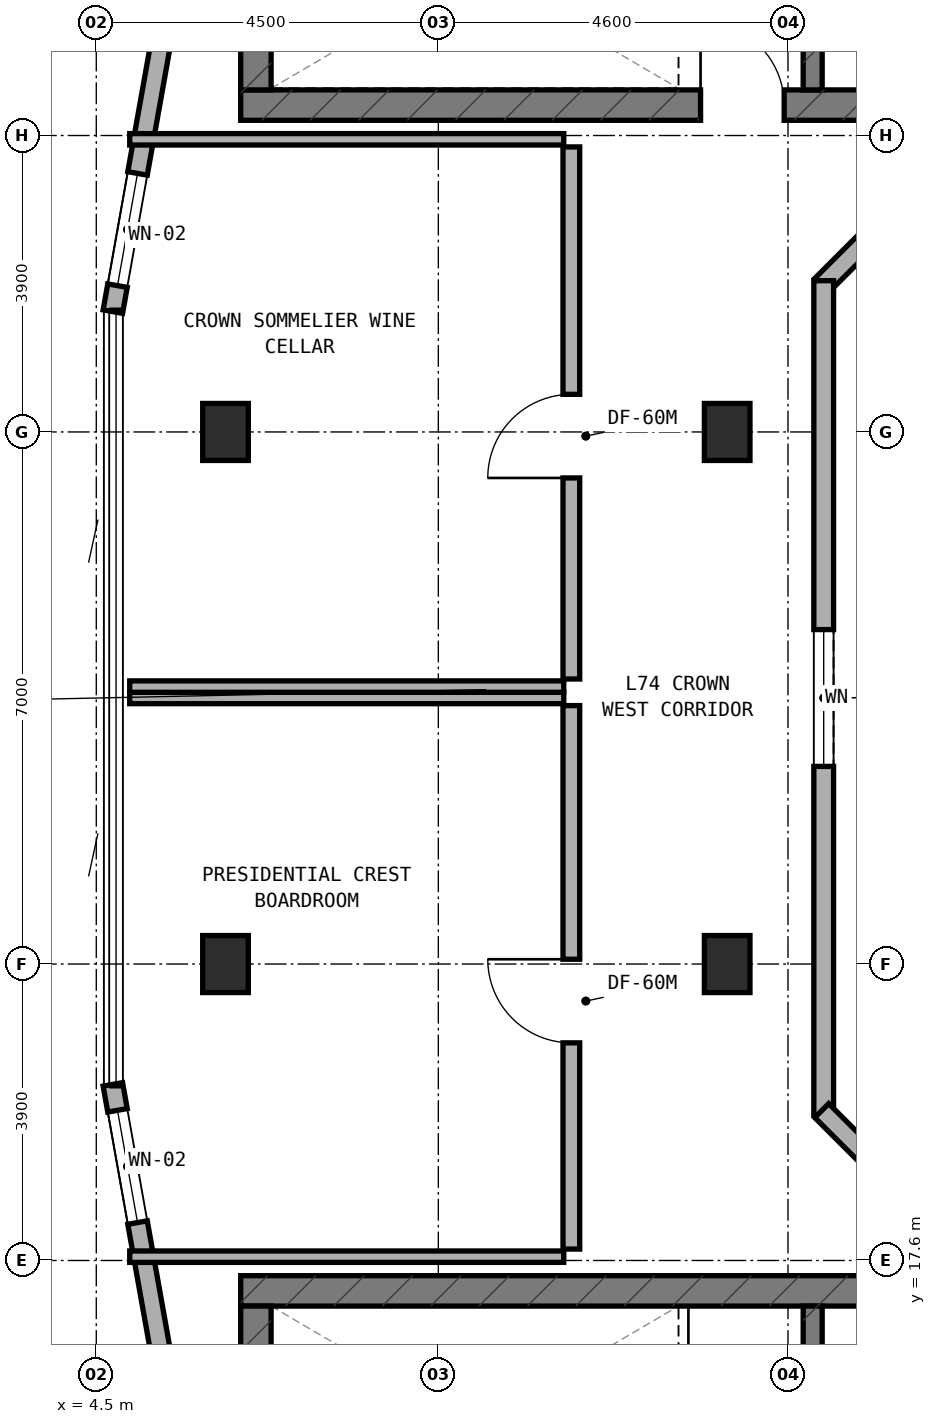
"""IFC4 building model, lengths in metres.
Left out: names, types, materials, properties, quantities, classifications, styles, units other than length and angle.
Written with IfcOpenShell. Run it as: python <this file> out.ifc"""

import sys

from ifc_helpers import new_model, si_unit, direction, frame, frame_2d, origin, origin_2d, place, context, subcontext, project, spatial, rectangle, extrude, element, fill, save


model = new_model("IFC4")
c1 = context("Model", 3, precision=1e-05, world=origin(), true_north=direction((0.0, 1.0)))
c2 = subcontext(c1, "Body", "Model", "MODEL_VIEW")
j1 = project(units=[si_unit("LENGTHUNIT", "METRE"), si_unit("PLANEANGLEUNIT", "RADIAN")], contexts=[c1])
p1 = place(None, origin())
s1 = spatial("IfcSite", under=j1, at=p1, CompositionType="ELEMENT")
p2 = place(p1, origin())
s2 = spatial("IfcBuilding", under=s1, at=p2, CompositionType="ELEMENT")
p3 = place(p2, frame((0.0, 0.0, 272.0)))
s3 = spatial("IfcBuildingStorey", under=s2, at=p3, CompositionType="ELEMENT", Elevation=272.0)
p4 = place(p3, frame((6.4, 32.8, 0.0), z_axis=(0.0, 0.0, 1.0), x_axis=(1.0, 0.0, 0.0)))
e1 = element("IfcWall", 1, at=p4, inside=s3, PredefinedType="SHEAR", context=c2, shape_type="SweptSolid", body=[
    extrude(rectangle(XDim=24.4, YDim=0.4, at=frame_2d((12.2, 0.0))), origin(), (0.0, 0.0, 1.0), 4.56),
])
p5 = place(p4, frame((6.05, 0.0, 0.0)))
e2 = element("IfcOpeningElement", 2, at=p5, cuts=e1, PredefinedType="OPENING", context=c2, shape_type="SweptSolid", body=[
    extrude(rectangle(XDim=1.1, YDim=2.15, at=frame_2d((0.55, 1.075))), frame((0.0, 0.21, 0.0), z_axis=(0.0, -1.0, 0.0), x_axis=(1.0, 0.0, 0.0)), (0.0, 0.0, 1.0), 0.42),
])
p6 = place(p3, frame((6.6, 33.0, 0.0), z_axis=(0.0, 0.0, 1.0), x_axis=(0.0, 1.0, 0.0)))
e3 = element("IfcWall", 3, at=p6, inside=s3, PredefinedType="SHEAR", context=c2, shape_type="SweptSolid", body=[
    extrude(rectangle(XDim=3.16, YDim=0.4, at=frame_2d((1.58, 0.0))), origin(), (0.0, 0.0, 1.0), 4.56),
])
p7 = place(p3, frame((13.925, 33.0, 0.0), z_axis=(0.0, 0.0, 1.0), x_axis=(0.0, 1.0, 0.0)))
e4 = element("IfcWall", 4, at=p7, inside=s3, PredefinedType="STANDARD", context=c2, shape_type="SweptSolid", body=[
    extrude(rectangle(XDim=3.16, YDim=0.25, at=frame_2d((1.58, 0.0))), origin(), (0.0, 0.0, 1.0), 4.52),
])
p8 = place(p7, frame((0.98, 0.0, 0.0)))
e5 = element("IfcOpeningElement", 5, at=p8, cuts=e4, PredefinedType="OPENING", context=c2, shape_type="SweptSolid", body=[
    extrude(rectangle(XDim=1.1, YDim=2.15, at=frame_2d((0.55, 1.075))), frame((0.0, 0.135, 0.0), z_axis=(0.0, -1.0, 0.0), x_axis=(1.0, 0.0, 0.0)), (0.0, 0.0, 1.0), 0.27),
])
p9 = place(p3, frame((6.4, 17.2, 0.0), z_axis=(0.0, 0.0, 1.0), x_axis=(1.0, 0.0, 0.0)))
e6 = element("IfcWall", 6, at=p9, inside=s3, PredefinedType="SHEAR", context=c2, shape_type="SweptSolid", body=[
    extrude(rectangle(XDim=24.4, YDim=0.4, at=frame_2d((12.2, 0.0))), origin(), (0.0, 0.0, 1.0), 4.56),
])
p10 = place(p3, frame((6.6, 13.84, 0.0), z_axis=(0.0, 0.0, 1.0), x_axis=(0.0, 1.0, 0.0)))
e7 = element("IfcWall", 7, at=p10, inside=s3, PredefinedType="SHEAR", context=c2, shape_type="SweptSolid", body=[
    extrude(rectangle(XDim=3.16, YDim=0.4, at=frame_2d((1.58, 0.0))), origin(), (0.0, 0.0, 1.0), 4.56),
])
p11 = place(p3, frame((13.925, 13.84, 0.0), z_axis=(0.0, 0.0, 1.0), x_axis=(0.0, 1.0, 0.0)))
e8 = element("IfcWall", 8, at=p11, inside=s3, PredefinedType="STANDARD", context=c2, shape_type="SweptSolid", body=[
    extrude(rectangle(XDim=3.16, YDim=0.25, at=frame_2d((1.58, 0.0))), origin(), (0.0, 0.0, 1.0), 4.52),
])
p12 = place(p11, frame((0.98, 0.0, 0.0)))
e9 = element("IfcOpeningElement", 9, at=p12, cuts=e8, PredefinedType="OPENING", context=c2, shape_type="SweptSolid", body=[
    extrude(rectangle(XDim=1.1, YDim=2.15, at=frame_2d((0.55, 1.075))), frame((0.0, 0.135, 0.0), z_axis=(0.0, -1.0, 0.0), x_axis=(1.0, 0.0, 0.0)), (0.0, 0.0, 1.0), 0.27),
])
for number, where, z_axis, x_axis in (
    (10, (6.2, 21.5, 0.0), (0.0, 0.0, 1.0), (1.0, 0.0, 0.0)),
    (11, (6.2, 28.5, 0.0), (0.0, 0.0, 1.0), (1.0, 0.0, 0.0)),
):
    element("IfcColumn", number, at=place(p3, frame(where, z_axis=z_axis, x_axis=x_axis)), inside=s3, PredefinedType="COLUMN", context=c2, shape_type="SweptSolid", body=[
        extrude(rectangle(XDim=0.6, YDim=0.75, at=origin_2d()), origin(), (0.0, 0.0, 1.0), 3.068),
    ])
for number, where, z_axis, x_axis in (
    (12, (12.8, 21.5, 0.0), (0.0, 0.0, 1.0), (1.0, 0.0, 0.0)),
    (13, (12.8, 28.5, 0.0), (0.0, 0.0, 1.0), (1.0, 0.0, 0.0)),
):
    element("IfcColumn", number, at=place(p3, frame(where, z_axis=z_axis, x_axis=x_axis)), inside=s3, PredefinedType="COLUMN", context=c2, shape_type="SweptSolid", body=[
        extrude(rectangle(XDim=0.6, YDim=0.75, at=origin_2d()), origin(), (0.0, 0.0, 1.0), 4.471),
    ])
p13 = place(p3, frame((6.129, 37.985, 0.0), z_axis=(0.0, 0.0, 1.0), x_axis=(-0.175766426993, -0.984431898682, 0.0)))
e14 = element("IfcWall", 14, at=p13, inside=s3, PredefinedType="STANDARD", context=c2, shape_type="SweptSolid", body=[
    extrude(rectangle(XDim=8.027, YDim=0.26, at=frame_2d((4.014, 0.0))), origin(), (0.0, 0.0, 1.0), 2.74),
])
p14 = place(p13, frame((1.753, 0.0, 0.85)))
e15 = element("IfcOpeningElement", 15, at=p14, cuts=e14, PredefinedType="OPENING", context=c2, shape_type="SweptSolid", body=[
    extrude(rectangle(XDim=2.1, YDim=1.5, at=frame_2d((1.05, 0.75))), frame((0.0, 0.14, 0.0), z_axis=(0.0, -1.0, 0.0), x_axis=(1.0, 0.0, 0.0)), (0.0, 0.0, 1.0), 0.28),
])
p15 = place(p13, frame((6.18, 0.0, 0.85)))
e16 = element("IfcOpeningElement", 16, at=p15, cuts=e14, PredefinedType="OPENING", context=c2, shape_type="SweptSolid", body=[
    extrude(rectangle(XDim=1.5, YDim=1.5, at=frame_2d((0.75, 0.75))), frame((0.0, 0.14, 0.0), z_axis=(0.0, -1.0, 0.0), x_axis=(1.0, 0.0, 0.0)), (0.0, 0.0, 1.0), 0.28),
])
p16 = place(p3, frame((4.718, 19.917, 0.0), z_axis=(0.0, 0.0, 1.0), x_axis=(0.175766426993, -0.984431898682, 0.0)))
e17 = element("IfcWall", 17, at=p16, inside=s3, PredefinedType="STANDARD", context=c2, shape_type="SweptSolid", body=[
    extrude(rectangle(XDim=8.027, YDim=0.26, at=frame_2d((4.014, 0.0))), origin(), (0.0, 0.0, 1.0), 2.74),
])
p17 = place(p16, frame((0.347, 0.0, 0.85)))
e18 = element("IfcOpeningElement", 18, at=p17, cuts=e17, PredefinedType="OPENING", context=c2, shape_type="SweptSolid", body=[
    extrude(rectangle(XDim=1.5, YDim=1.5, at=frame_2d((0.75, 0.75))), frame((0.0, 0.14, 0.0), z_axis=(0.0, -1.0, 0.0), x_axis=(1.0, 0.0, 0.0)), (0.0, 0.0, 1.0), 0.28),
])
p18 = place(p16, frame((4.173, 0.0, 0.85)))
e19 = element("IfcOpeningElement", 19, at=p18, cuts=e17, PredefinedType="OPENING", context=c2, shape_type="SweptSolid", body=[
    extrude(rectangle(XDim=2.1, YDim=1.5, at=frame_2d((1.05, 0.75))), frame((0.0, 0.14, 0.0), z_axis=(0.0, -1.0, 0.0), x_axis=(1.0, 0.0, 0.0)), (0.0, 0.0, 1.0), 0.28),
])
p19 = place(p3, frame((15.678, 32.062, 0.0), z_axis=(0.0, 0.0, 1.0), x_axis=(-0.707106781187, -0.707106781187, 0.0)))
e20 = element("IfcWall", 20, at=p19, inside=s3, PredefinedType="STANDARD", context=c2, shape_type="SweptSolid", body=[
    extrude(rectangle(XDim=2.311, YDim=0.26, at=frame_2d((1.155, 0.0))), origin(), (0.0, 0.0, 1.0), 2.74),
])
p20 = place(p3, frame((14.07, 30.49, 0.0), z_axis=(0.0, 0.0, 1.0), x_axis=(0.0, -1.0, 0.0)))
e21 = element("IfcWall", 21, at=p20, inside=s3, PredefinedType="STANDARD", context=c2, shape_type="SweptSolid", body=[
    extrude(rectangle(XDim=10.98, YDim=0.26, at=frame_2d((5.49, 0.0))), origin(), (0.0, 0.0, 1.0), 2.74),
])
p21 = place(p20, frame((4.59, 0.0, 0.85)))
e22 = element("IfcOpeningElement", 22, at=p21, cuts=e21, PredefinedType="OPENING", context=c2, shape_type="SweptSolid", body=[
    extrude(rectangle(XDim=1.8, YDim=1.5, at=frame_2d((0.9, 0.75))), frame((0.0, 0.14, 0.0), z_axis=(0.0, -1.0, 0.0), x_axis=(1.0, 0.0, 0.0)), (0.0, 0.0, 1.0), 0.28),
])
p22 = place(p3, frame((14.044, 19.572, 0.0), z_axis=(0.0, 0.0, 1.0), x_axis=(0.707106781187, -0.707106781187, 0.0)))
e23 = element("IfcWall", 23, at=p22, inside=s3, PredefinedType="STANDARD", context=c2, shape_type="SweptSolid", body=[
    extrude(rectangle(XDim=2.311, YDim=0.26, at=frame_2d((1.155, 0.0))), origin(), (0.0, 0.0, 1.0), 2.74),
])
for number, where, z_axis, x_axis in (
    (24, (4.94, 17.65, 0.0), (0.0, 0.0, 1.0), (1.0, 0.0, 0.0)),
    (25, (4.94, 25.0, 0.0), (0.0, 0.0, 1.0), (1.0, 0.0, 0.0)),
):
    element("IfcWall", number, at=place(p3, frame(where, z_axis=z_axis, x_axis=x_axis)), inside=s3, PredefinedType="PARTITIONING", context=c2, shape_type="SweptSolid", body=[
        extrude(rectangle(XDim=5.71, YDim=0.15, at=frame_2d((2.855, 0.0))), origin(), (0.0, 0.0, 1.0), 2.72),
    ])
p23 = place(p3, frame((10.75, 17.75, 0.0), z_axis=(0.0, 0.0, 1.0), x_axis=(0.0, 1.0, 0.0)))
e26 = element("IfcWall", 26, at=p23, inside=s3, PredefinedType="SOLIDWALL", context=c2, shape_type="SweptSolid", body=[
    extrude(rectangle(XDim=7.15, YDim=0.22, at=frame_2d((3.575, 0.0))), origin(), (0.0, 0.0, 1.0), 2.72),
])
p24 = place(p23, frame((2.713, 0.0, 0.0)))
e27 = element("IfcOpeningElement", 27, at=p24, cuts=e26, PredefinedType="OPENING", context=c2, shape_type="SweptSolid", body=[
    extrude(rectangle(XDim=1.1, YDim=2.1, at=frame_2d((0.55, 1.05))), frame((0.0, 0.12, 0.0), z_axis=(0.0, -1.0, 0.0), x_axis=(1.0, 0.0, 0.0)), (0.0, 0.0, 1.0), 0.24),
])
for number, where, z_axis, x_axis in (
    (28, (4.94, 25.15, 0.0), (0.0, 0.0, 1.0), (1.0, 0.0, 0.0)),
    (29, (4.94, 32.35, 0.0), (0.0, 0.0, 1.0), (1.0, 0.0, 0.0)),
):
    element("IfcWall", number, at=place(p3, frame(where, z_axis=z_axis, x_axis=x_axis)), inside=s3, PredefinedType="PARTITIONING", context=c2, shape_type="SweptSolid", body=[
        extrude(rectangle(XDim=5.71, YDim=0.15, at=frame_2d((2.855, 0.0))), origin(), (0.0, 0.0, 1.0), 2.72),
    ])
p25 = place(p3, frame((10.75, 25.25, 0.0), z_axis=(0.0, 0.0, 1.0), x_axis=(0.0, 1.0, 0.0)))
e30 = element("IfcWall", 30, at=p25, inside=s3, PredefinedType="SOLIDWALL", context=c2, shape_type="SweptSolid", body=[
    extrude(rectangle(XDim=7.0, YDim=0.22, at=frame_2d((3.5, 0.0))), origin(), (0.0, 0.0, 1.0), 2.72),
])
p26 = place(p25, frame((2.645, 0.0, 0.0)))
e31 = element("IfcOpeningElement", 31, at=p26, cuts=e30, PredefinedType="OPENING", context=c2, shape_type="SweptSolid", body=[
    extrude(rectangle(XDim=1.1, YDim=2.1, at=frame_2d((0.55, 1.05))), frame((0.0, 0.12, 0.0), z_axis=(0.0, -1.0, 0.0), x_axis=(1.0, 0.0, 0.0)), (0.0, 0.0, 1.0), 0.24),
])
p27 = place(p15, origin())
e32 = element("IfcWindow", 32, at=p27, inside=s3, PartitioningType="SINGLE_PANEL", PredefinedType="WINDOW", context=c2, shape_type="SweptSolid", body=[
    extrude(rectangle(XDim=1.5, YDim=1.5, at=frame_2d((0.75, 0.75))), frame((0.0, 0.03, 0.0), z_axis=(0.0, -1.0, 0.0), x_axis=(1.0, 0.0, 0.0)), (0.0, 0.0, 1.0), 0.06),
])
fill(e16, e32)
p28 = place(p17, origin())
e33 = element("IfcWindow", 33, at=p28, inside=s3, PartitioningType="SINGLE_PANEL", PredefinedType="WINDOW", context=c2, shape_type="SweptSolid", body=[
    extrude(rectangle(XDim=1.5, YDim=1.5, at=frame_2d((0.75, 0.75))), frame((0.0, 0.03, 0.0), z_axis=(0.0, -1.0, 0.0), x_axis=(1.0, 0.0, 0.0)), (0.0, 0.0, 1.0), 0.06),
])
fill(e18, e33)
p29 = place(p21, origin())
e34 = element("IfcWindow", 34, at=p29, inside=s3, PartitioningType="SINGLE_PANEL", PredefinedType="WINDOW", context=c2, shape_type="SweptSolid", body=[
    extrude(rectangle(XDim=1.8, YDim=1.5, at=frame_2d((0.9, 0.75))), frame((0.0, 0.03, 0.0), z_axis=(0.0, -1.0, 0.0), x_axis=(1.0, 0.0, 0.0)), (0.0, 0.0, 1.0), 0.06),
])
fill(e22, e34)
p30 = place(p5, origin())
e35 = element("IfcDoor", 35, at=p30, inside=s3, OperationType="SINGLE_SWING_LEFT", PredefinedType="DOOR", context=c2, shape_type="SweptSolid", body=[
    extrude(rectangle(XDim=1.1, YDim=2.15, at=frame_2d((0.55, 1.075))), frame((0.0, 0.025, 0.0), z_axis=(0.0, -1.0, 0.0), x_axis=(1.0, 0.0, 0.0)), (0.0, 0.0, 1.0), 0.05),
])
fill(e2, e35)
p31 = place(p24, origin())
e36 = element("IfcDoor", 36, at=p31, inside=s3, OperationType="SINGLE_SWING_RIGHT", PredefinedType="DOOR", context=c2, shape_type="SweptSolid", body=[
    extrude(rectangle(XDim=1.1, YDim=2.1, at=frame_2d((0.55, 1.05))), frame((0.0, 0.025, 0.0), z_axis=(0.0, -1.0, 0.0), x_axis=(1.0, 0.0, 0.0)), (0.0, 0.0, 1.0), 0.05),
])
fill(e27, e36)
p32 = place(p26, origin())
e37 = element("IfcDoor", 37, at=p32, inside=s3, OperationType="SINGLE_SWING_LEFT", PredefinedType="DOOR", context=c2, shape_type="SweptSolid", body=[
    extrude(rectangle(XDim=1.1, YDim=2.1, at=frame_2d((0.55, 1.05))), frame((0.0, 0.025, 0.0), z_axis=(0.0, -1.0, 0.0), x_axis=(1.0, 0.0, 0.0)), (0.0, 0.0, 1.0), 0.05),
])
fill(e31, e37)
save(model, sys.argv[1])
